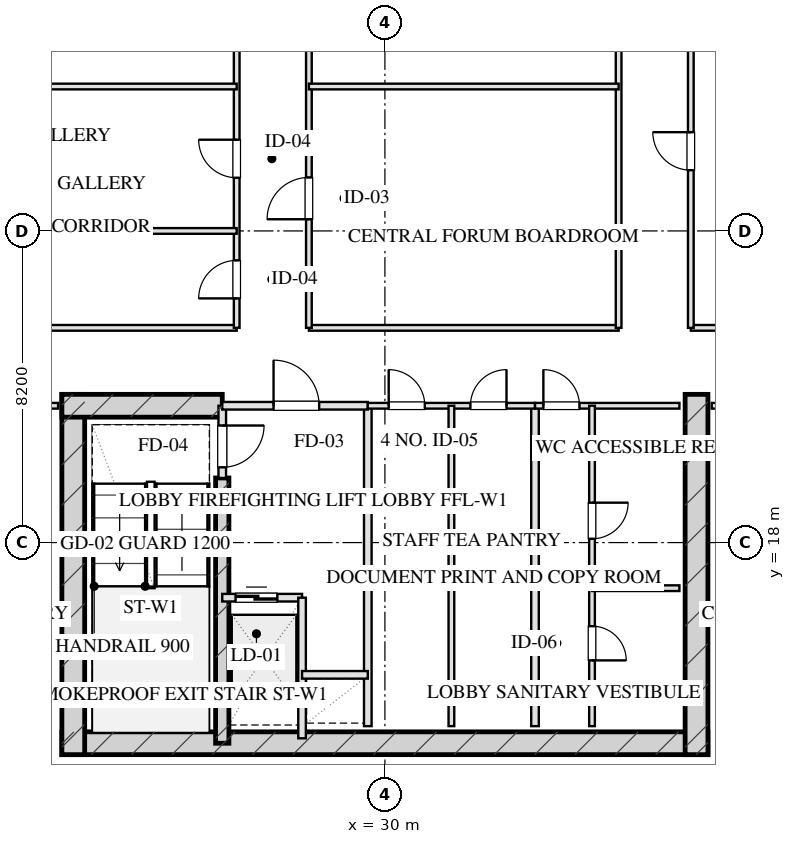
"""IFC4 building model, lengths in metres.
Left out: names, types, materials, properties, quantities, classifications, styles, units other than length and angle.
Written with IfcOpenShell. Run it as: python <this file> out.ifc"""

import sys

from ifc_helpers import new_model, si_unit, direction, frame, frame_2d, origin, place, context, subcontext, project, spatial, rectangle, extrude, element, fill, save


model = new_model("IFC4")
c1 = context("Model", 3, precision=1e-05, world=origin(), true_north=direction((0.0, 1.0)))
c2 = subcontext(c1, "Body", "Model", "MODEL_VIEW")
j1 = project(units=[si_unit("LENGTHUNIT", "METRE"), si_unit("PLANEANGLEUNIT", "RADIAN")], contexts=[c1])
p1 = place(None, origin())
s1 = spatial("IfcSite", under=j1, at=p1, CompositionType="ELEMENT")
p2 = place(p1, origin())
s2 = spatial("IfcBuilding", under=s1, at=p2, CompositionType="ELEMENT")
p3 = place(p2, frame((0.0, 0.0, 173.65)))
s3 = spatial("IfcBuildingStorey", under=s2, at=p3, CompositionType="ELEMENT", Elevation=173.65)
p4 = place(p3, frame((21.5, 12.72, 0.0), z_axis=(0.0, 0.0, 1.0), x_axis=(1.0, 0.0, 0.0)))
e1 = element("IfcWall", 1, at=p4, inside=s3, PredefinedType="SHEAR", context=c2, shape_type="SweptSolid", body=[
    extrude(rectangle(XDim=17.0, YDim=0.6, at=frame_2d((8.5, 0.0))), origin(), (0.0, 0.0, 1.0), 3.45),
])
for number, where, z_axis, x_axis in (
    (2, (21.8, 21.9, 0.0), (0.0, 0.0, 1.0), (0.0, -1.0, 0.0)),
    (3, (38.2, 21.9, 0.0), (0.0, 0.0, 1.0), (0.0, -1.0, 0.0)),
):
    element("IfcWall", number, at=place(p3, frame(where, z_axis=z_axis, x_axis=x_axis)), inside=s3, PredefinedType="SHEAR", context=c2, shape_type="SweptSolid", body=[
        extrude(rectangle(XDim=9.48, YDim=0.6, at=frame_2d((4.74, 0.0))), origin(), (0.0, 0.0, 1.0), 3.45),
    ])
p5 = place(p3, frame((25.72, 19.7, 0.0), z_axis=(0.0, 0.0, 1.0), x_axis=(0.0, -1.0, 0.0)))
e4 = element("IfcWall", 4, at=p5, inside=s3, PredefinedType="SHEAR", context=c2, shape_type="SweptSolid", body=[
    extrude(rectangle(XDim=6.98, YDim=0.35, at=frame_2d((3.49, 0.0))), origin(), (0.0, 0.0, 1.0), 3.45),
])
p6 = place(p3, frame((21.5, 21.6, 0.0), z_axis=(0.0, 0.0, 1.0), x_axis=(1.0, 0.0, 0.0)))
e5 = element("IfcWall", 5, at=p6, inside=s3, PredefinedType="SHEAR", context=c2, shape_type="SweptSolid", body=[
    extrude(rectangle(XDim=4.22, YDim=0.6, at=frame_2d((2.11, 0.0))), origin(), (0.0, 0.0, 1.0), 3.45),
])
p7 = place(p3, frame((25.72, 21.6, 0.0), z_axis=(0.0, 0.0, 1.0), x_axis=(0.0, -1.0, 0.0)))
e6 = element("IfcWall", 6, at=p7, inside=s3, PredefinedType="PARTITIONING", context=c2, shape_type="SweptSolid", body=[
    extrude(rectangle(XDim=1.9, YDim=0.2, at=frame_2d((0.95, 0.0))), origin(), (0.0, 0.0, 1.0), 3.175),
])
p8 = place(p7, frame((0.52, 0.0, 0.0)))
e7 = element("IfcOpeningElement", 7, at=p8, cuts=e6, PredefinedType="OPENING", context=c2, shape_type="SweptSolid", body=[
    extrude(rectangle(XDim=1.1, YDim=2.05, at=frame_2d((0.55, 1.025))), frame((0.0, 0.11, 0.0), z_axis=(0.0, -1.0, 0.0), x_axis=(1.0, 0.0, 0.0)), (0.0, 0.0, 1.0), 0.22),
])
p9 = place(p3, frame((29.55, 21.6, 0.0), z_axis=(0.0, 0.0, 1.0), x_axis=(0.0, -1.0, 0.0)))
e8 = element("IfcWall", 8, at=p9, inside=s3, PredefinedType="PARTITIONING", context=c2, shape_type="SweptSolid", body=[
    extrude(rectangle(XDim=8.43, YDim=0.2, at=frame_2d((4.215, 0.0))), origin(), (0.0, 0.0, 1.0), 3.175),
])
p10 = place(p3, frame((25.72, 21.6, 0.0), z_axis=(0.0, 0.0, 1.0), x_axis=(1.0, 0.0, 0.0)))
e9 = element("IfcWall", 9, at=p10, inside=s3, PredefinedType="PARTITIONING", context=c2, shape_type="SweptSolid", body=[
    extrude(rectangle(XDim=3.83, YDim=0.2, at=frame_2d((1.915, 0.0))), origin(), (0.0, 0.0, 1.0), 3.175),
])
p11 = place(p10, frame((1.35, 0.0, 0.0)))
e10 = element("IfcOpeningElement", 10, at=p11, cuts=e9, PredefinedType="OPENING", context=c2, shape_type="SweptSolid", body=[
    extrude(rectangle(XDim=1.2, YDim=2.05, at=frame_2d((0.6, 1.025))), frame((0.0, 0.11, 0.0), z_axis=(0.0, -1.0, 0.0), x_axis=(1.0, 0.0, 0.0)), (0.0, 0.0, 1.0), 0.22),
])
p12 = place(p3, frame((25.72, 16.55, 0.0), z_axis=(0.0, 0.0, 1.0), x_axis=(1.0, 0.0, 0.0)))
e11 = element("IfcWall", 11, at=p12, inside=s3, PredefinedType="PARTITIONING", context=c2, shape_type="SweptSolid", body=[
    extrude(rectangle(XDim=2.1, YDim=0.2, at=frame_2d((1.05, 0.0))), origin(), (0.0, 0.0, 1.0), 3.175),
])
p13 = place(p12, frame((0.35, 0.0, 0.0)))
e12 = element("IfcOpeningElement", 12, at=p13, cuts=e11, PredefinedType="OPENING", context=c2, shape_type="SweptSolid", body=[
    extrude(rectangle(XDim=1.1, YDim=2.05, at=frame_2d((0.55, 1.025))), frame((0.0, 0.11, 0.0), z_axis=(0.0, -1.0, 0.0), x_axis=(1.0, 0.0, 0.0)), (0.0, 0.0, 1.0), 0.22),
])
p14 = place(p3, frame((27.82, 16.55, 0.0), z_axis=(0.0, 0.0, 1.0), x_axis=(0.0, -1.0, 0.0)))
e13 = element("IfcWall", 13, at=p14, inside=s3, PredefinedType="PARTITIONING", context=c2, shape_type="SweptSolid", body=[
    extrude(rectangle(XDim=3.7, YDim=0.2, at=frame_2d((1.85, 0.0))), origin(), (0.0, 0.0, 1.0), 3.175),
])
p15 = place(p3, frame((27.82, 14.52, 0.0), z_axis=(0.0, 0.0, 1.0), x_axis=(1.0, 0.0, 0.0)))
e14 = element("IfcWall", 14, at=p15, inside=s3, PredefinedType="PARTITIONING", context=c2, shape_type="SweptSolid", body=[
    extrude(rectangle(XDim=1.73, YDim=0.2, at=frame_2d((0.865, 0.0))), origin(), (0.0, 0.0, 1.0), 3.175),
])
p16 = place(p3, frame((33.95, 21.6, 0.0), z_axis=(0.0, 0.0, 1.0), x_axis=(0.0, -1.0, 0.0)))
e15 = element("IfcWall", 15, at=p16, inside=s3, PredefinedType="PARTITIONING", context=c2, shape_type="SweptSolid", body=[
    extrude(rectangle(XDim=8.43, YDim=0.2, at=frame_2d((4.215, 0.0))), origin(), (0.0, 0.0, 1.0), 3.175),
])
p17 = place(p3, frame((29.55, 21.6, 0.0), z_axis=(0.0, 0.0, 1.0), x_axis=(1.0, 0.0, 0.0)))
e16 = element("IfcWall", 16, at=p17, inside=s3, PredefinedType="PARTITIONING", context=c2, shape_type="SweptSolid", body=[
    extrude(rectangle(XDim=4.4, YDim=0.15, at=frame_2d((2.2, 0.0))), origin(), (0.0, 0.0, 1.0), 3.175),
])
p18 = place(p17, frame((0.55, 0.0, 0.0)))
e17 = element("IfcOpeningElement", 17, at=p18, cuts=e16, PredefinedType="OPENING", context=c2, shape_type="SweptSolid", body=[
    extrude(rectangle(XDim=0.95, YDim=2.05, at=frame_2d((0.475, 1.025))), frame((0.0, 0.085, 0.0), z_axis=(0.0, -1.0, 0.0), x_axis=(1.0, 0.0, 0.0)), (0.0, 0.0, 1.0), 0.17),
])
p19 = place(p17, frame((2.7, 0.0, 0.0)))
e18 = element("IfcOpeningElement", 18, at=p19, cuts=e16, PredefinedType="OPENING", context=c2, shape_type="SweptSolid", body=[
    extrude(rectangle(XDim=0.95, YDim=2.05, at=frame_2d((0.475, 1.025))), frame((0.0, 0.085, 0.0), z_axis=(0.0, -1.0, 0.0), x_axis=(1.0, 0.0, 0.0)), (0.0, 0.0, 1.0), 0.17),
])
p20 = place(p3, frame((31.75, 21.6, 0.0), z_axis=(0.0, 0.0, 1.0), x_axis=(0.0, -1.0, 0.0)))
e19 = element("IfcWall", 19, at=p20, inside=s3, PredefinedType="PARTITIONING", context=c2, shape_type="SweptSolid", body=[
    extrude(rectangle(XDim=8.43, YDim=0.15, at=frame_2d((4.215, 0.0))), origin(), (0.0, 0.0, 1.0), 3.175),
])
p21 = place(p3, frame((33.95, 21.6, 0.0), z_axis=(0.0, 0.0, 1.0), x_axis=(1.0, 0.0, 0.0)))
e20 = element("IfcWall", 20, at=p21, inside=s3, PredefinedType="PARTITIONING", context=c2, shape_type="SweptSolid", body=[
    extrude(rectangle(XDim=3.8, YDim=0.15, at=frame_2d((1.9, 0.0))), origin(), (0.0, 0.0, 1.0), 3.175),
])
p22 = place(p21, frame((0.22, 0.0, 0.0)))
e21 = element("IfcOpeningElement", 21, at=p22, cuts=e20, PredefinedType="OPENING", context=c2, shape_type="SweptSolid", body=[
    extrude(rectangle(XDim=0.95, YDim=2.05, at=frame_2d((0.475, 1.025))), frame((0.0, 0.085, 0.0), z_axis=(0.0, -1.0, 0.0), x_axis=(1.0, 0.0, 0.0)), (0.0, 0.0, 1.0), 0.17),
])
p23 = place(p3, frame((35.45, 21.6, 0.0), z_axis=(0.0, 0.0, 1.0), x_axis=(0.0, -1.0, 0.0)))
e22 = element("IfcWall", 22, at=p23, inside=s3, PredefinedType="PARTITIONING", context=c2, shape_type="SweptSolid", body=[
    extrude(rectangle(XDim=8.43, YDim=0.15, at=frame_2d((4.215, 0.0))), origin(), (0.0, 0.0, 1.0), 2.765),
])
p24 = place(p23, frame((2.55, 0.0, 0.0)))
e23 = element("IfcOpeningElement", 23, at=p24, cuts=e22, PredefinedType="OPENING", context=c2, shape_type="SweptSolid", body=[
    extrude(rectangle(XDim=0.95, YDim=2.05, at=frame_2d((0.475, 1.025))), frame((0.0, 0.085, 0.0), z_axis=(0.0, -1.0, 0.0), x_axis=(1.0, 0.0, 0.0)), (0.0, 0.0, 1.0), 0.17),
])
p25 = place(p23, frame((5.8, 0.0, 0.0)))
e24 = element("IfcOpeningElement", 24, at=p25, cuts=e22, PredefinedType="OPENING", context=c2, shape_type="SweptSolid", body=[
    extrude(rectangle(XDim=0.9, YDim=2.05, at=frame_2d((0.45, 1.025))), frame((0.0, 0.085, 0.0), z_axis=(0.0, -1.0, 0.0), x_axis=(1.0, 0.0, 0.0)), (0.0, 0.0, 1.0), 0.17),
])
p26 = place(p3, frame((35.45, 16.8, 0.0), z_axis=(0.0, 0.0, 1.0), x_axis=(1.0, 0.0, 0.0)))
e25 = element("IfcWall", 25, at=p26, inside=s3, PredefinedType="PARTITIONING", context=c2, shape_type="SweptSolid", body=[
    extrude(rectangle(XDim=2.3, YDim=0.15, at=frame_2d((1.15, 0.0))), origin(), (0.0, 0.0, 1.0), 3.175),
])
p27 = place(p3, frame((13.2, 21.6, 0.0), z_axis=(0.0, 0.0, 1.0), x_axis=(1.0, 0.0, 0.0)))
e26 = element("IfcWall", 26, at=p27, inside=s3, PredefinedType="PARTITIONING", context=c2, shape_type="SweptSolid", body=[
    extrude(rectangle(XDim=8.2, YDim=0.15, at=frame_2d((4.1, 0.0))), origin(), (0.0, 0.0, 1.0), 3.175),
])
p28 = place(p27, frame((3.444, 0.0, 0.0)))
e27 = element("IfcOpeningElement", 27, at=p28, cuts=e26, PredefinedType="OPENING", context=c2, shape_type="SweptSolid", body=[
    extrude(rectangle(XDim=1.0, YDim=2.05, at=frame_2d((0.5, 1.025))), frame((0.0, 0.085, 0.0), z_axis=(0.0, -1.0, 0.0), x_axis=(1.0, 0.0, 0.0)), (0.0, 0.0, 1.0), 0.17),
])
p29 = place(p3, frame((38.6, 21.6, 0.0), z_axis=(0.0, 0.0, 1.0), x_axis=(1.0, 0.0, 0.0)))
e28 = element("IfcWall", 28, at=p29, inside=s3, PredefinedType="PARTITIONING", context=c2, shape_type="SweptSolid", body=[
    extrude(rectangle(XDim=8.2, YDim=0.15, at=frame_2d((4.1, 0.0))), origin(), (0.0, 0.0, 1.0), 3.175),
])
p30 = place(p29, frame((3.444, 0.0, 0.0)))
e29 = element("IfcOpeningElement", 29, at=p30, cuts=e28, PredefinedType="OPENING", context=c2, shape_type="SweptSolid", body=[
    extrude(rectangle(XDim=1.05, YDim=2.05, at=frame_2d((0.525, 1.025))), frame((0.0, 0.085, 0.0), z_axis=(0.0, -1.0, 0.0), x_axis=(1.0, 0.0, 0.0)), (0.0, 0.0, 1.0), 0.17),
])
p31 = place(p3, frame((13.2, 23.65, 0.0), z_axis=(0.0, 0.0, 1.0), x_axis=(1.0, 0.0, 0.0)))
e30 = element("IfcWall", 30, at=p31, inside=s3, PredefinedType="PARTITIONING", context=c2, shape_type="SweptSolid", body=[
    extrude(rectangle(XDim=12.9, YDim=0.15, at=frame_2d((6.45, 0.0))), origin(), (0.0, 0.0, 1.0), 3.175),
])
p32 = place(p3, frame((28.0, 23.65, 0.0), z_axis=(0.0, 0.0, 1.0), x_axis=(1.0, 0.0, 0.0)))
e31 = element("IfcWall", 31, at=p32, inside=s3, PredefinedType="PARTITIONING", context=c2, shape_type="SweptSolid", body=[
    extrude(rectangle(XDim=8.15, YDim=0.15, at=frame_2d((4.075, 0.0))), origin(), (0.0, 0.0, 1.0), 3.175),
])
p33 = place(p3, frame((38.05, 23.65, 0.0), z_axis=(0.0, 0.0, 1.0), x_axis=(1.0, 0.0, 0.0)))
e32 = element("IfcWall", 32, at=p33, inside=s3, PredefinedType="PARTITIONING", context=c2, shape_type="SweptSolid", body=[
    extrude(rectangle(XDim=8.75, YDim=0.15, at=frame_2d((4.375, 0.0))), origin(), (0.0, 0.0, 1.0), 3.175),
])
p34 = place(p3, frame((26.1, 23.65, 0.0), z_axis=(0.0, 0.0, 1.0), x_axis=(0.0, 1.0, 0.0)))
e33 = element("IfcWall", 33, at=p34, inside=s3, PredefinedType="PARTITIONING", context=c2, shape_type="SweptSolid", body=[
    extrude(rectangle(XDim=20.7, YDim=0.15, at=frame_2d((10.35, 0.0))), origin(), (0.0, 0.0, 1.0), 3.175),
])
p35 = place(p34, frame((0.775, 0.0, 0.0)))
e34 = element("IfcOpeningElement", 34, at=p35, cuts=e33, PredefinedType="OPENING", context=c2, shape_type="SweptSolid", body=[
    extrude(rectangle(XDim=1.0, YDim=2.05, at=frame_2d((0.5, 1.025))), frame((0.0, 0.085, 0.0), z_axis=(0.0, -1.0, 0.0), x_axis=(1.0, 0.0, 0.0)), (0.0, 0.0, 1.0), 0.17),
])
p36 = place(p34, frame((3.95, 0.0, 0.0)))
e35 = element("IfcOpeningElement", 35, at=p36, cuts=e33, PredefinedType="OPENING", context=c2, shape_type="SweptSolid", body=[
    extrude(rectangle(XDim=1.0, YDim=2.05, at=frame_2d((0.5, 1.025))), frame((0.0, 0.085, 0.0), z_axis=(0.0, -1.0, 0.0), x_axis=(1.0, 0.0, 0.0)), (0.0, 0.0, 1.0), 0.17),
])
p37 = place(p34, frame((7.51, 0.0, 0.0)))
e36 = element("IfcOpeningElement", 36, at=p37, cuts=e33, PredefinedType="OPENING", context=c2, shape_type="SweptSolid", body=[
    extrude(rectangle(XDim=1.0, YDim=2.05, at=frame_2d((0.5, 1.025))), frame((0.0, 0.085, 0.0), z_axis=(0.0, -1.0, 0.0), x_axis=(1.0, 0.0, 0.0)), (0.0, 0.0, 1.0), 0.17),
])
p38 = place(p34, frame((11.51, 0.0, 0.0)))
e37 = element("IfcOpeningElement", 37, at=p38, cuts=e33, PredefinedType="OPENING", context=c2, shape_type="SweptSolid", body=[
    extrude(rectangle(XDim=1.0, YDim=2.05, at=frame_2d((0.5, 1.025))), frame((0.0, 0.085, 0.0), z_axis=(0.0, -1.0, 0.0), x_axis=(1.0, 0.0, 0.0)), (0.0, 0.0, 1.0), 0.17),
])
p39 = place(p34, frame((15.75, 0.0, 0.0)))
e38 = element("IfcOpeningElement", 38, at=p39, cuts=e33, PredefinedType="OPENING", context=c2, shape_type="SweptSolid", body=[
    extrude(rectangle(XDim=1.05, YDim=2.05, at=frame_2d((0.525, 1.025))), frame((0.0, 0.085, 0.0), z_axis=(0.0, -1.0, 0.0), x_axis=(1.0, 0.0, 0.0)), (0.0, 0.0, 1.0), 0.17),
])
p40 = place(p34, frame((18.925, 0.0, 0.0)))
e39 = element("IfcOpeningElement", 39, at=p40, cuts=e33, PredefinedType="OPENING", context=c2, shape_type="SweptSolid", body=[
    extrude(rectangle(XDim=1.0, YDim=2.05, at=frame_2d((0.5, 1.025))), frame((0.0, 0.085, 0.0), z_axis=(0.0, -1.0, 0.0), x_axis=(1.0, 0.0, 0.0)), (0.0, 0.0, 1.0), 0.17),
])
p41 = place(p3, frame((28.0, 23.65, 0.0), z_axis=(0.0, 0.0, 1.0), x_axis=(0.0, 1.0, 0.0)))
e40 = element("IfcWall", 40, at=p41, inside=s3, PredefinedType="PARTITIONING", context=c2, shape_type="SweptSolid", body=[
    extrude(rectangle(XDim=20.7, YDim=0.15, at=frame_2d((10.35, 0.0))), origin(), (0.0, 0.0, 1.0), 3.175),
])
p42 = place(p41, frame((2.857, 0.0, 0.0)))
e41 = element("IfcOpeningElement", 41, at=p42, cuts=e40, PredefinedType="OPENING", context=c2, shape_type="SweptSolid", body=[
    extrude(rectangle(XDim=1.1, YDim=2.05, at=frame_2d((0.55, 1.025))), frame((0.0, 0.085, 0.0), z_axis=(0.0, -1.0, 0.0), x_axis=(1.0, 0.0, 0.0)), (0.0, 0.0, 1.0), 0.17),
])
p43 = place(p41, frame((17.208, 0.0, 0.0)))
e42 = element("IfcOpeningElement", 42, at=p43, cuts=e40, PredefinedType="OPENING", context=c2, shape_type="SweptSolid", body=[
    extrude(rectangle(XDim=1.1, YDim=2.05, at=frame_2d((0.55, 1.025))), frame((0.0, 0.085, 0.0), z_axis=(0.0, -1.0, 0.0), x_axis=(1.0, 0.0, 0.0)), (0.0, 0.0, 1.0), 0.17),
])
p44 = place(p3, frame((36.15, 23.65, 0.0), z_axis=(0.0, 0.0, 1.0), x_axis=(0.0, 1.0, 0.0)))
e43 = element("IfcWall", 43, at=p44, inside=s3, PredefinedType="PARTITIONING", context=c2, shape_type="SweptSolid", body=[
    extrude(rectangle(XDim=20.7, YDim=0.15, at=frame_2d((10.35, 0.0))), origin(), (0.0, 0.0, 1.0), 3.175),
])
p45 = place(p44, frame((9.71, 0.0, 0.0)))
e44 = element("IfcOpeningElement", 44, at=p45, cuts=e43, PredefinedType="OPENING", context=c2, shape_type="SweptSolid", body=[
    extrude(rectangle(XDim=1.1, YDim=2.05, at=frame_2d((0.55, 1.025))), frame((0.0, 0.085, 0.0), z_axis=(0.0, -1.0, 0.0), x_axis=(1.0, 0.0, 0.0)), (0.0, 0.0, 1.0), 0.17),
])
p46 = place(p3, frame((38.05, 23.65, 0.0), z_axis=(0.0, 0.0, 1.0), x_axis=(0.0, 1.0, 0.0)))
e45 = element("IfcWall", 45, at=p46, inside=s3, PredefinedType="PARTITIONING", context=c2, shape_type="SweptSolid", body=[
    extrude(rectangle(XDim=20.7, YDim=0.15, at=frame_2d((10.35, 0.0))), origin(), (0.0, 0.0, 1.0), 3.175),
])
p47 = place(p46, frame((4.148, 0.0, 0.0)))
e46 = element("IfcOpeningElement", 46, at=p47, cuts=e45, PredefinedType="OPENING", context=c2, shape_type="SweptSolid", body=[
    extrude(rectangle(XDim=1.0, YDim=2.05, at=frame_2d((0.5, 1.025))), frame((0.0, 0.085, 0.0), z_axis=(0.0, -1.0, 0.0), x_axis=(1.0, 0.0, 0.0)), (0.0, 0.0, 1.0), 0.17),
])
p48 = place(p46, frame((14.499, 0.0, 0.0)))
e47 = element("IfcOpeningElement", 47, at=p48, cuts=e45, PredefinedType="OPENING", context=c2, shape_type="SweptSolid", body=[
    extrude(rectangle(XDim=1.0, YDim=2.05, at=frame_2d((0.5, 1.025))), frame((0.0, 0.085, 0.0), z_axis=(0.0, -1.0, 0.0), x_axis=(1.0, 0.0, 0.0)), (0.0, 0.0, 1.0), 0.17),
])
p49 = place(p3, frame((28.0, 30.0, 0.0), z_axis=(0.0, 0.0, 1.0), x_axis=(1.0, 0.0, 0.0)))
e48 = element("IfcWall", 48, at=p49, inside=s3, PredefinedType="PARTITIONING", context=c2, shape_type="SweptSolid", body=[
    extrude(rectangle(XDim=8.15, YDim=0.15, at=frame_2d((4.075, 0.0))), origin(), (0.0, 0.0, 1.0), 3.175),
])
for number, where, z_axis, x_axis in (
    (49, (13.2, 26.2, 0.0), (0.0, 0.0, 1.0), (1.0, 0.0, 0.0)),
    (50, (13.2, 30.0, 0.0), (0.0, 0.0, 1.0), (1.0, 0.0, 0.0)),
):
    element("IfcWall", number, at=place(p3, frame(where, z_axis=z_axis, x_axis=x_axis)), inside=s3, PredefinedType="PARTITIONING", context=c2, shape_type="SweptSolid", body=[
        extrude(rectangle(XDim=12.9, YDim=0.15, at=frame_2d((6.45, 0.0))), origin(), (0.0, 0.0, 1.0), 3.175),
    ])
p50 = place(p8, origin())
e51 = element("IfcDoor", 51, at=p50, inside=s3, OperationType="SINGLE_SWING_LEFT", PredefinedType="DOOR", context=c2, shape_type="SweptSolid", body=[
    extrude(rectangle(XDim=1.1, YDim=2.05, at=frame_2d((0.55, 1.025))), frame((0.0, 0.025, 0.0), z_axis=(0.0, -1.0, 0.0), x_axis=(1.0, 0.0, 0.0)), (0.0, 0.0, 1.0), 0.05),
])
fill(e7, e51)
p51 = place(p11, origin())
e52 = element("IfcDoor", 52, at=p51, inside=s3, OperationType="SINGLE_SWING_LEFT", PredefinedType="DOOR", context=c2, shape_type="SweptSolid", body=[
    extrude(rectangle(XDim=1.2, YDim=2.05, at=frame_2d((0.6, 1.025))), frame((0.0, 0.025, 0.0), z_axis=(0.0, -1.0, 0.0), x_axis=(1.0, 0.0, 0.0)), (0.0, 0.0, 1.0), 0.05),
])
fill(e10, e52)
p52 = place(p13, origin())
e53 = element("IfcDoor", 53, at=p52, inside=s3, OperationType="DOUBLE_DOOR_SLIDING", PredefinedType="DOOR", context=c2, shape_type="SweptSolid", body=[
    extrude(rectangle(XDim=1.1, YDim=2.05, at=frame_2d((0.55, 1.025))), frame((0.0, 0.025, 0.0), z_axis=(0.0, -1.0, 0.0), x_axis=(1.0, 0.0, 0.0)), (0.0, 0.0, 1.0), 0.05),
])
fill(e12, e53)
p53 = place(p18, origin())
e54 = element("IfcDoor", 54, at=p53, inside=s3, OperationType="SINGLE_SWING_LEFT", PredefinedType="DOOR", context=c2, shape_type="SweptSolid", body=[
    extrude(rectangle(XDim=0.95, YDim=2.05, at=frame_2d((0.475, 1.025))), frame((0.0, 0.025, 0.0), z_axis=(0.0, -1.0, 0.0), x_axis=(1.0, 0.0, 0.0)), (0.0, 0.0, 1.0), 0.05),
])
fill(e17, e54)
p54 = place(p19, origin())
e55 = element("IfcDoor", 55, at=p54, inside=s3, OperationType="SINGLE_SWING_RIGHT", PredefinedType="DOOR", context=c2, shape_type="SweptSolid", body=[
    extrude(rectangle(XDim=0.95, YDim=2.05, at=frame_2d((0.475, 1.025))), frame((0.0, 0.025, 0.0), z_axis=(0.0, -1.0, 0.0), x_axis=(1.0, 0.0, 0.0)), (0.0, 0.0, 1.0), 0.05),
])
fill(e18, e55)
p55 = place(p22, origin())
e56 = element("IfcDoor", 56, at=p55, inside=s3, OperationType="SINGLE_SWING_LEFT", PredefinedType="DOOR", context=c2, shape_type="SweptSolid", body=[
    extrude(rectangle(XDim=0.95, YDim=2.05, at=frame_2d((0.475, 1.025))), frame((0.0, 0.025, 0.0), z_axis=(0.0, -1.0, 0.0), x_axis=(1.0, 0.0, 0.0)), (0.0, 0.0, 1.0), 0.05),
])
fill(e21, e56)
p56 = place(p24, origin())
e57 = element("IfcDoor", 57, at=p56, inside=s3, OperationType="SINGLE_SWING_LEFT", PredefinedType="DOOR", context=c2, shape_type="SweptSolid", body=[
    extrude(rectangle(XDim=0.95, YDim=2.05, at=frame_2d((0.475, 1.025))), frame((0.0, 0.025, 0.0), z_axis=(0.0, -1.0, 0.0), x_axis=(1.0, 0.0, 0.0)), (0.0, 0.0, 1.0), 0.05),
])
fill(e23, e57)
p57 = place(p25, origin())
e58 = element("IfcDoor", 58, at=p57, inside=s3, OperationType="SINGLE_SWING_RIGHT", PredefinedType="DOOR", context=c2, shape_type="SweptSolid", body=[
    extrude(rectangle(XDim=0.9, YDim=2.05, at=frame_2d((0.45, 1.025))), frame((0.0, 0.025, 0.0), z_axis=(0.0, -1.0, 0.0), x_axis=(1.0, 0.0, 0.0)), (0.0, 0.0, 1.0), 0.05),
])
fill(e24, e58)
p58 = place(p35, origin())
e59 = element("IfcDoor", 59, at=p58, inside=s3, OperationType="SINGLE_SWING_LEFT", PredefinedType="DOOR", context=c2, shape_type="SweptSolid", body=[
    extrude(rectangle(XDim=1.0, YDim=2.05, at=frame_2d((0.5, 1.025))), frame((0.0, 0.025, 0.0), z_axis=(0.0, -1.0, 0.0), x_axis=(1.0, 0.0, 0.0)), (0.0, 0.0, 1.0), 0.05),
])
fill(e34, e59)
p59 = place(p36, origin())
e60 = element("IfcDoor", 60, at=p59, inside=s3, OperationType="SINGLE_SWING_RIGHT", PredefinedType="DOOR", context=c2, shape_type="SweptSolid", body=[
    extrude(rectangle(XDim=1.0, YDim=2.05, at=frame_2d((0.5, 1.025))), frame((0.0, 0.025, 0.0), z_axis=(0.0, -1.0, 0.0), x_axis=(1.0, 0.0, 0.0)), (0.0, 0.0, 1.0), 0.05),
])
fill(e35, e60)
p60 = place(p42, origin())
e61 = element("IfcDoor", 61, at=p60, inside=s3, OperationType="SINGLE_SWING_LEFT", PredefinedType="DOOR", context=c2, shape_type="SweptSolid", body=[
    extrude(rectangle(XDim=1.1, YDim=2.05, at=frame_2d((0.55, 1.025))), frame((0.0, 0.025, 0.0), z_axis=(0.0, -1.0, 0.0), x_axis=(1.0, 0.0, 0.0)), (0.0, 0.0, 1.0), 0.05),
])
fill(e41, e61)
p61 = place(p47, origin())
e62 = element("IfcDoor", 62, at=p61, inside=s3, OperationType="SINGLE_SWING_RIGHT", PredefinedType="DOOR", context=c2, shape_type="SweptSolid", body=[
    extrude(rectangle(XDim=1.0, YDim=2.05, at=frame_2d((0.5, 1.025))), frame((0.0, 0.025, 0.0), z_axis=(0.0, -1.0, 0.0), x_axis=(1.0, 0.0, 0.0)), (0.0, 0.0, 1.0), 0.05),
])
fill(e46, e62)
save(model, sys.argv[1])
